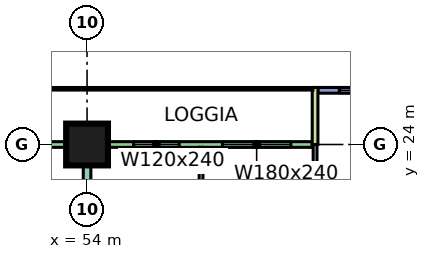
"""IFC4 building model, lengths in metres.
Left out: names, types, materials, properties, quantities, classifications, styles, units other than length and angle.
Written with IfcOpenShell. Run it as: python <this file> out.ifc"""

import sys

from ifc_helpers import new_model, si_unit, direction, frame, frame_2d, origin, origin_2d, place, context, subcontext, project, spatial, rectangle, extrude, element, fill, save


model = new_model("IFC4")
c1 = context("Model", 3, precision=1e-05, world=origin(), true_north=direction((0.0, 1.0)))
c2 = subcontext(c1, "Body", "Model", "MODEL_VIEW")
j1 = project(units=[si_unit("LENGTHUNIT", "METRE"), si_unit("PLANEANGLEUNIT", "RADIAN")], contexts=[c1])
p1 = place(None, origin())
s1 = spatial("IfcSite", under=j1, at=p1, CompositionType="ELEMENT")
p2 = place(p1, origin())
s2 = spatial("IfcBuilding", under=s1, at=p2, CompositionType="ELEMENT")
p3 = place(p2, frame((0.0, 0.0, 78.9)))
s3 = spatial("IfcBuildingStorey", under=s2, at=p3, CompositionType="ELEMENT", Elevation=78.9)
p4 = place(p3, frame((54.0, 24.0, 0.0), z_axis=(0.0, 0.0, 1.0), x_axis=(1.0, 0.0, 0.0)))
e1 = element("IfcColumn", 1, at=p4, inside=s3, PredefinedType="COLUMN", context=c2, shape_type="SweptSolid", body=[
    extrude(rectangle(XDim=1.1, YDim=1.1, at=origin_2d()), origin(), (0.0, 0.0, 1.0), 3.75),
])
p5 = place(p3, frame((70.5, 25.425, 0.0), z_axis=(0.0, 0.0, 1.0), x_axis=(-1.0, 0.0, 0.0)))
e2 = element("IfcWall", 2, at=p5, inside=s3, PredefinedType="SOLIDWALL", context=c2, shape_type="SweptSolid", body=[
    extrude(rectangle(XDim=10.425, YDim=0.15, at=frame_2d((5.212, 0.0))), origin(), (0.0, 0.0, 1.0), 3.35),
])
p6 = place(p5, frame((0.3, 0.0, 0.45)))
e3 = element("IfcOpeningElement", 3, at=p6, cuts=e2, PredefinedType="OPENING", context=c2, shape_type="SweptSolid", body=[
    extrude(rectangle(XDim=0.9, YDim=2.4, at=frame_2d((0.45, 1.2))), frame((0.0, 0.085, 0.0), z_axis=(0.0, -1.0, 0.0), x_axis=(1.0, 0.0, 0.0)), (0.0, 0.0, 1.0), 0.17),
])
p7 = place(p5, frame((2.1, 0.0, 0.45)))
e4 = element("IfcOpeningElement", 4, at=p7, cuts=e2, PredefinedType="OPENING", context=c2, shape_type="SweptSolid", body=[
    extrude(rectangle(XDim=1.8, YDim=2.4, at=frame_2d((0.9, 1.2))), frame((0.0, 0.085, 0.0), z_axis=(0.0, -1.0, 0.0), x_axis=(1.0, 0.0, 0.0)), (0.0, 0.0, 1.0), 0.17),
])
p8 = place(p5, frame((5.1, 0.0, 0.45)))
e5 = element("IfcOpeningElement", 5, at=p8, cuts=e2, PredefinedType="OPENING", context=c2, shape_type="SweptSolid", body=[
    extrude(rectangle(XDim=1.8, YDim=2.4, at=frame_2d((0.9, 1.2))), frame((0.0, 0.085, 0.0), z_axis=(0.0, -1.0, 0.0), x_axis=(1.0, 0.0, 0.0)), (0.0, 0.0, 1.0), 0.17),
])
p9 = place(p5, frame((8.062, 0.0, 0.45)))
e6 = element("IfcOpeningElement", 6, at=p9, cuts=e2, PredefinedType="OPENING", context=c2, shape_type="SweptSolid", body=[
    extrude(rectangle(XDim=1.8, YDim=2.4, at=frame_2d((0.9, 1.2))), frame((0.0, 0.085, 0.0), z_axis=(0.0, -1.0, 0.0), x_axis=(1.0, 0.0, 0.0)), (0.0, 0.0, 1.0), 0.17),
])
p10 = place(p3, frame((59.925, 24.0, 0.0), z_axis=(0.0, 0.0, 1.0), x_axis=(-1.0, 0.0, 0.0)))
e7 = element("IfcWall", 7, at=p10, inside=s3, PredefinedType="SOLIDWALL", context=c2, shape_type="SweptSolid", body=[
    extrude(rectangle(XDim=11.85, YDim=0.15, at=frame_2d((5.925, 0.0))), origin(), (0.0, 0.0, 1.0), 3.35),
])
p11 = place(p10, frame((0.562, 0.0, 0.45)))
e8 = element("IfcOpeningElement", 8, at=p11, cuts=e7, PredefinedType="OPENING", context=c2, shape_type="SweptSolid", body=[
    extrude(rectangle(XDim=1.8, YDim=2.4, at=frame_2d((0.9, 1.2))), frame((0.0, 0.085, 0.0), z_axis=(0.0, -1.0, 0.0), x_axis=(1.0, 0.0, 0.0)), (0.0, 0.0, 1.0), 0.17),
])
p12 = place(p10, frame((3.5, 0.0, 0.45)))
e9 = element("IfcOpeningElement", 9, at=p12, cuts=e7, PredefinedType="OPENING", context=c2, shape_type="SweptSolid", body=[
    extrude(rectangle(XDim=1.2, YDim=2.4, at=frame_2d((0.6, 1.2))), frame((0.0, 0.085, 0.0), z_axis=(0.0, -1.0, 0.0), x_axis=(1.0, 0.0, 0.0)), (0.0, 0.0, 1.0), 0.17),
])
p13 = place(p10, frame((7.113, 0.0, 0.45)))
e10 = element("IfcOpeningElement", 10, at=p13, cuts=e7, PredefinedType="OPENING", context=c2, shape_type="SweptSolid", body=[
    extrude(rectangle(XDim=4.2, YDim=2.4, at=frame_2d((2.1, 1.2))), frame((0.0, 0.085, 0.0), z_axis=(0.0, -1.0, 0.0), x_axis=(1.0, 0.0, 0.0)), (0.0, 0.0, 1.0), 0.17),
])
p14 = place(p3, frame((60.0, 25.5, 0.0), z_axis=(0.0, 0.0, 1.0), x_axis=(0.0, -1.0, 0.0)))
e11 = element("IfcWall", 11, at=p14, inside=s3, PredefinedType="SOLIDWALL", context=c2, shape_type="SweptSolid", body=[
    extrude(rectangle(XDim=1.5, YDim=0.15, at=frame_2d((0.75, 0.0))), origin(), (0.0, 0.0, 1.0), 3.35),
])
p15 = place(p3, frame((54.0, 18.6, 0.0), z_axis=(0.0, 0.0, 1.0), x_axis=(0.0, 1.0, 0.0)))
e12 = element("IfcWall", 12, at=p15, inside=s3, PredefinedType="PARTITIONING", context=c2, shape_type="SweptSolid", body=[
    extrude(rectangle(XDim=5.326, YDim=0.2, at=frame_2d((2.663, 0.0))), origin(), (0.0, 0.0, 1.0), 3.35),
])
p16 = place(p3, frame((57.0, 19.85, 0.0), z_axis=(0.0, 0.0, 1.0), x_axis=(0.0, 1.0, 0.0)))
e13 = element("IfcWall", 13, at=p16, inside=s3, PredefinedType="PARTITIONING", context=c2, shape_type="SweptSolid", body=[
    extrude(rectangle(XDim=4.076, YDim=0.1, at=frame_2d((2.038, 0.0))), origin(), (0.0, 0.0, 1.0), 3.35),
])
p17 = place(p3, frame((60.0, 19.85, 0.0), z_axis=(0.0, 0.0, 1.0), x_axis=(0.0, 1.0, 0.0)))
e14 = element("IfcWall", 14, at=p17, inside=s3, PredefinedType="PARTITIONING", context=c2, shape_type="SweptSolid", body=[
    extrude(rectangle(XDim=4.15, YDim=0.1, at=frame_2d((2.075, 0.0))), origin(), (0.0, 0.0, 1.0), 3.35),
])
p18 = place(p9, origin())
e15 = element("IfcWindow", 15, at=p18, inside=s3, PartitioningType="SINGLE_PANEL", PredefinedType="WINDOW", context=c2, shape_type="SweptSolid", body=[
    extrude(rectangle(XDim=1.8, YDim=2.4, at=frame_2d((0.9, 1.2))), frame((0.0, 0.03, 0.0), z_axis=(0.0, -1.0, 0.0), x_axis=(1.0, 0.0, 0.0)), (0.0, 0.0, 1.0), 0.06),
])
fill(e6, e15)
p19 = place(p11, origin())
e16 = element("IfcWindow", 16, at=p19, inside=s3, PartitioningType="SINGLE_PANEL", PredefinedType="WINDOW", context=c2, shape_type="SweptSolid", body=[
    extrude(rectangle(XDim=1.8, YDim=2.4, at=frame_2d((0.9, 1.2))), frame((0.0, 0.03, 0.0), z_axis=(0.0, -1.0, 0.0), x_axis=(1.0, 0.0, 0.0)), (0.0, 0.0, 1.0), 0.06),
])
fill(e8, e16)
p20 = place(p12, origin())
e17 = element("IfcWindow", 17, at=p20, inside=s3, PartitioningType="SINGLE_PANEL", PredefinedType="WINDOW", context=c2, shape_type="SweptSolid", body=[
    extrude(rectangle(XDim=1.2, YDim=2.4, at=frame_2d((0.6, 1.2))), frame((0.0, 0.03, 0.0), z_axis=(0.0, -1.0, 0.0), x_axis=(1.0, 0.0, 0.0)), (0.0, 0.0, 1.0), 0.06),
])
fill(e9, e17)
save(model, sys.argv[1])
